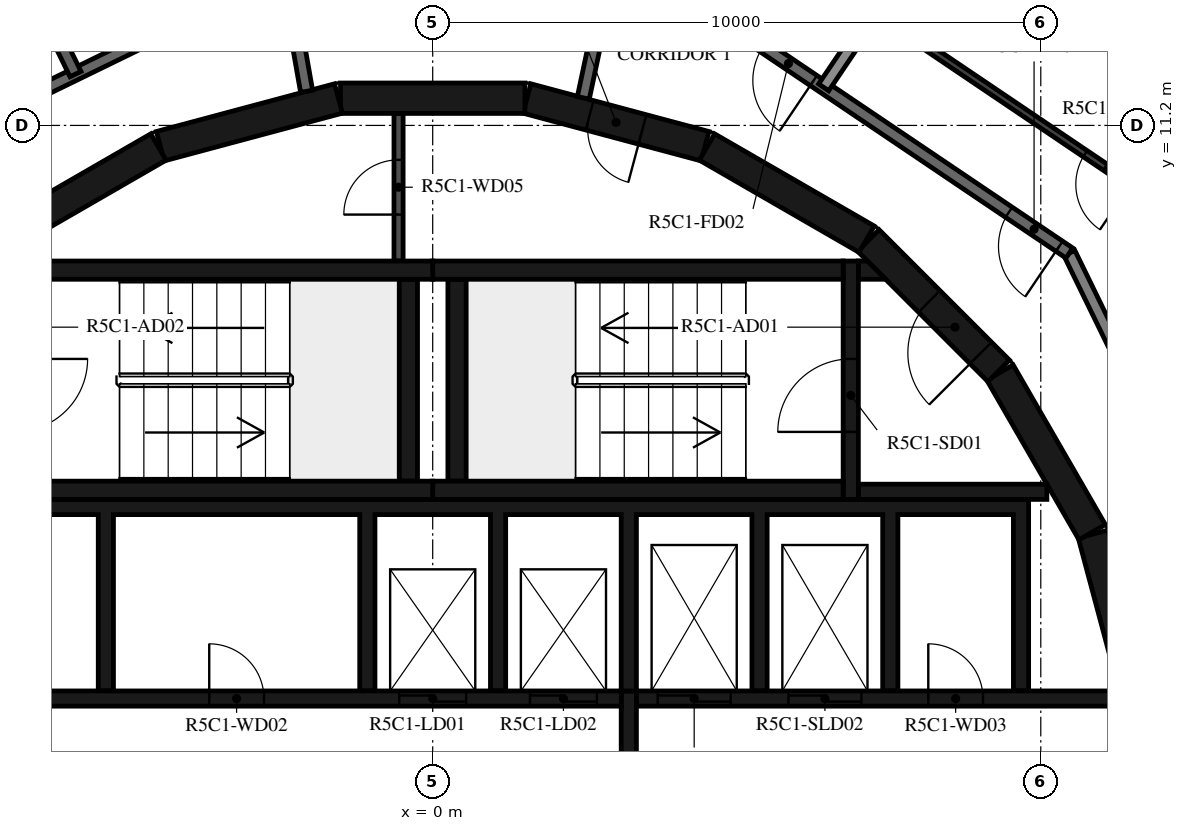
"""IFC4 building model, lengths in metres.
Left out: names, types, materials, properties, quantities, classifications, styles, units other than length and angle.
Written with IfcOpenShell. Run it as: python <this file> out.ifc"""

import sys

from ifc_helpers import new_model, si_unit, direction, frame, frame_2d, origin, place, context, subcontext, project, spatial, polyline, rectangle, outline, extrude, element, fill, save


model = new_model("IFC4")
c1 = context("Model", 3, precision=1e-05, world=origin(), true_north=direction((0.0, 1.0)))
c2 = subcontext(c1, "Body", "Model", "MODEL_VIEW")
j1 = project(units=[si_unit("LENGTHUNIT", "METRE"), si_unit("PLANEANGLEUNIT", "RADIAN")], contexts=[c1])
p1 = place(None, origin())
s1 = spatial("IfcSite", under=j1, at=p1, CompositionType="ELEMENT")
p2 = place(p1, origin())
s2 = spatial("IfcBuilding", under=s1, at=p2, CompositionType="ELEMENT")
p3 = place(p2, frame((0.0, 0.0, 212.9)))
s3 = spatial("IfcBuildingStorey", under=s2, at=p3, CompositionType="ELEMENT", Elevation=212.9)
for number, where, z_axis, x_axis in (
    (1, (11.643, 1.55, 0.0), (0.0, 0.0, 1.0), (-0.259, 0.966, 0.0)),
    (2, (10.845, 4.51, 0.0), (0.0, 0.0, 1.0), (-0.5, 0.866, 0.0)),
):
    element("IfcWall", number, at=place(p3, frame(where, z_axis=z_axis, x_axis=x_axis)), inside=s3, PredefinedType="SHEAR", context=c2, shape_type="SweptSolid", body=[
        extrude(rectangle(XDim=3.033, YDim=0.5, at=frame_2d((1.516, 0.0))), origin(), (0.0, 0.0, 1.0), 3.12),
    ])
p4 = place(p3, frame((9.308, 7.164, 0.0), z_axis=(0.0, 0.0, 1.0), x_axis=(-0.707106781187, 0.707106781187, 0.0)))
e3 = element("IfcWall", 3, at=p4, inside=s3, PredefinedType="SHEAR", context=c2, shape_type="SweptSolid", body=[
    extrude(rectangle(XDim=3.032, YDim=0.5, at=frame_2d((1.516, 0.0))), origin(), (0.0, 0.0, 1.0), 3.12),
])
p5 = place(p4, frame((0.416, 0.0, 0.0)))
e4 = element("IfcOpeningElement", 4, at=p5, cuts=e3, PredefinedType="OPENING", context=c2, shape_type="SweptSolid", body=[
    extrude(rectangle(XDim=1.2, YDim=2.1, at=frame_2d((0.6, 1.05))), frame((0.0, 0.26, 0.0), z_axis=(0.0, -1.0, 0.0), x_axis=(1.0, 0.0, 0.0)), (0.0, 0.0, 1.0), 0.52),
])
p6 = place(p3, frame((7.137, 9.329, 0.0), z_axis=(0.0, 0.0, 1.0), x_axis=(-0.865975092491, 0.500087131594, 0.0)))
e5 = element("IfcWall", 5, at=p6, inside=s3, PredefinedType="SHEAR", context=c2, shape_type="SweptSolid", body=[
    extrude(rectangle(XDim=3.033, YDim=0.5, at=frame_2d((1.516, 0.0))), origin(), (0.0, 0.0, 1.0), 3.12),
])
p7 = place(p3, frame((4.479, 10.858, 0.0), z_axis=(0.0, 0.0, 1.0), x_axis=(-0.965948410781, 0.258734743916, 0.0)))
e6 = element("IfcWall", 6, at=p7, inside=s3, PredefinedType="SHEAR", context=c2, shape_type="SweptSolid", body=[
    extrude(rectangle(XDim=3.033, YDim=0.5, at=frame_2d((1.516, 0.0))), origin(), (0.0, 0.0, 1.0), 3.12),
])
p8 = place(p7, frame((1.066, 0.0, 0.0)))
e7 = element("IfcOpeningElement", 7, at=p8, cuts=e6, PredefinedType="OPENING", context=c2, shape_type="SweptSolid", body=[
    extrude(rectangle(XDim=0.9, YDim=2.1, at=frame_2d((0.45, 1.05))), frame((0.0, 0.26, 0.0), z_axis=(0.0, -1.0, 0.0), x_axis=(1.0, 0.0, 0.0)), (0.0, 0.0, 1.0), 0.52),
])
for number, where, z_axis, x_axis in (
    (8, (1.516, 11.647, 0.0), (0.0, 0.0, 1.0), (-1.0, 0.0, 0.0)),
    (9, (-1.55, 11.643, 0.0), (0.0, 0.0, 1.0), (-0.966, -0.259, 0.0)),
    (10, (-4.51, 10.845, 0.0), (0.0, 0.0, 1.0), (-0.866, -0.5, 0.0)),
):
    element("IfcWall", number, at=place(p3, frame(where, z_axis=z_axis, x_axis=x_axis)), inside=s3, PredefinedType="SHEAR", context=c2, shape_type="SweptSolid", body=[
        extrude(rectangle(XDim=3.033, YDim=0.5, at=frame_2d((1.516, 0.0))), origin(), (0.0, 0.0, 1.0), 3.12),
    ])
for number, where, z_axis, x_axis in (
    (11, (0.0, 5.2, 0.0), (0.0, 0.0, 1.0), (1.0, 0.0, 0.0)),
    (12, (0.0, 8.82, 0.0), (0.0, 0.0, 1.0), (1.0, 0.0, 0.0)),
):
    element("IfcWall", number, at=place(p3, frame(where, z_axis=z_axis, x_axis=x_axis)), inside=s3, PredefinedType="SHEAR", context=c2, shape_type="SweptSolid", body=[
        extrude(rectangle(XDim=6.75, YDim=0.3, at=frame_2d((3.375, 0.0))), origin(), (0.0, 0.0, 1.0), 3.12),
    ])
p9 = place(p3, frame((0.4, 5.35, 0.0), z_axis=(0.0, 0.0, 1.0), x_axis=(0.0, 1.0, 0.0)))
e13 = element("IfcWall", 13, at=p9, inside=s3, PredefinedType="SHEAR", context=c2, shape_type="SweptSolid", body=[
    extrude(rectangle(XDim=3.32, YDim=0.3, at=frame_2d((1.66, 0.0))), origin(), (0.0, 0.0, 1.0), 3.12),
])
p10 = place(p3, frame((6.875, 5.05, 0.0), z_axis=(0.0, 0.0, 1.0), x_axis=(0.0, 1.0, 0.0)))
e14 = element("IfcWall", 14, at=p10, inside=s3, PredefinedType="SHEAR", context=c2, shape_type="SweptSolid", body=[
    extrude(rectangle(XDim=3.92, YDim=0.25, at=frame_2d((1.96, 0.0))), origin(), (0.0, 0.0, 1.0), 3.12),
])
p11 = place(p10, frame((1.11, 0.0, 0.0)))
e15 = element("IfcOpeningElement", 15, at=p11, cuts=e14, PredefinedType="OPENING", context=c2, shape_type="SweptSolid", body=[
    extrude(rectangle(XDim=1.2, YDim=2.1, at=frame_2d((0.6, 1.05))), frame((0.0, 0.135, 0.0), z_axis=(0.0, -1.0, 0.0), x_axis=(1.0, 0.0, 0.0)), (0.0, 0.0, 1.0), 0.27),
])
p12 = place(p3, frame((7.0, 5.175, 0.0), z_axis=(0.0, 0.0, 1.0), x_axis=(1.0, 0.0, 0.0)))
e16 = element("IfcWall", 16, at=p12, inside=s3, PredefinedType="SHEAR", context=c2, shape_type="SweptSolid", body=[
    extrude(rectangle(XDim=3.1, YDim=0.25, at=frame_2d((1.55, 0.0))), origin(), (0.0, 0.0, 1.0), 3.12),
])
p13 = place(p3, origin())
e17 = element("IfcWall", 17, at=p13, inside=s3, PredefinedType="SHEAR", context=c2, shape_type="SweptSolid", body=[
    extrude(outline(polyline([(7.448, 8.67), (7.0, 8.67), (7.0, 8.97), (7.148, 8.97), (7.448, 8.67)])), origin(), (0.0, 0.0, 1.0), 3.12),
])
for number, where, z_axis, x_axis in (
    (18, (-6.75, 5.2, 0.0), (0.0, 0.0, 1.0), (1.0, 0.0, 0.0)),
    (19, (-6.75, 8.82, 0.0), (0.0, 0.0, 1.0), (1.0, 0.0, 0.0)),
):
    element("IfcWall", number, at=place(p3, frame(where, z_axis=z_axis, x_axis=x_axis)), inside=s3, PredefinedType="SHEAR", context=c2, shape_type="SweptSolid", body=[
        extrude(rectangle(XDim=6.75, YDim=0.3, at=frame_2d((3.375, 0.0))), origin(), (0.0, 0.0, 1.0), 3.12),
    ])
p14 = place(p3, frame((-0.4, 5.35, 0.0), z_axis=(0.0, 0.0, 1.0), x_axis=(0.0, 1.0, 0.0)))
e20 = element("IfcWall", 20, at=p14, inside=s3, PredefinedType="SHEAR", context=c2, shape_type="SweptSolid", body=[
    extrude(rectangle(XDim=3.32, YDim=0.3, at=frame_2d((1.66, 0.0))), origin(), (0.0, 0.0, 1.0), 3.12),
])
p15 = place(p3, origin())
e21 = element("IfcWall", 21, at=p15, inside=s3, PredefinedType="SHEAR", context=c2, shape_type="SweptSolid", body=[
    extrude(outline(polyline([(-9.55, 4.8), (-5.5, 4.8), (-5.5, 1.9), (-5.25, 1.9), (-5.25, 4.8), (-1.2, 4.8), (-1.2, 1.9), (-0.95, 1.9), (-0.95, 4.8), (0.95, 4.8), (0.95, 1.9), (1.2, 1.9), (1.2, 4.8), (3.1, 4.8), (3.1, 1.9), (3.35, 1.9), (3.35, 4.8), (5.25, 4.8), (5.25, 1.9), (5.5, 1.9), (5.5, 4.8), (7.4, 4.8), (7.4, 1.9), (7.65, 1.9), (7.65, 4.8), (9.55, 4.8), (9.55, 1.9), (9.8, 1.9), (9.8, 4.8), (9.8, 5.05), (-9.8, 5.05), (-9.8, 4.8), (-9.8, 1.9), (-9.55, 1.9), (-9.55, 4.8)])), origin(), (0.0, 0.0, 1.0), 3.12),
])
p16 = place(p3, frame((-11.28, 1.775, 0.0), z_axis=(0.0, 0.0, 1.0), x_axis=(1.0, 0.0, 0.0)))
e22 = element("IfcWall", 22, at=p16, inside=s3, PredefinedType="SHEAR", context=c2, shape_type="SweptSolid", body=[
    extrude(rectangle(XDim=14.38, YDim=0.25, at=frame_2d((7.19, 0.0))), origin(), (0.0, 0.0, 1.0), 3.12),
])
p17 = place(p16, frame((10.73, 0.0, 0.0)))
e23 = element("IfcOpeningElement", 23, at=p17, cuts=e22, PredefinedType="OPENING", context=c2, shape_type="SweptSolid", body=[
    extrude(rectangle(XDim=1.1, YDim=2.1, at=frame_2d((0.55, 1.05))), frame((0.0, 0.135, 0.0), z_axis=(0.0, -1.0, 0.0), x_axis=(1.0, 0.0, 0.0)), (0.0, 0.0, 1.0), 0.27),
])
p18 = place(p16, frame((12.88, 0.0, 0.0)))
e24 = element("IfcOpeningElement", 24, at=p18, cuts=e22, PredefinedType="OPENING", context=c2, shape_type="SweptSolid", body=[
    extrude(rectangle(XDim=1.1, YDim=2.1, at=frame_2d((0.55, 1.05))), frame((0.0, 0.135, 0.0), z_axis=(0.0, -1.0, 0.0), x_axis=(1.0, 0.0, 0.0)), (0.0, 0.0, 1.0), 0.27),
])
p19 = place(p16, frame((3.305, 0.0, 0.0)))
e25 = element("IfcOpeningElement", 25, at=p19, cuts=e22, PredefinedType="OPENING", context=c2, shape_type="SweptSolid", body=[
    extrude(rectangle(XDim=0.9, YDim=2.1, at=frame_2d((0.45, 1.05))), frame((0.0, 0.135, 0.0), z_axis=(0.0, -1.0, 0.0), x_axis=(1.0, 0.0, 0.0)), (0.0, 0.0, 1.0), 0.27),
])
p20 = place(p16, frame((7.605, 0.0, 0.0)))
e26 = element("IfcOpeningElement", 26, at=p20, cuts=e22, PredefinedType="OPENING", context=c2, shape_type="SweptSolid", body=[
    extrude(rectangle(XDim=0.9, YDim=2.1, at=frame_2d((0.45, 1.05))), frame((0.0, 0.135, 0.0), z_axis=(0.0, -1.0, 0.0), x_axis=(1.0, 0.0, 0.0)), (0.0, 0.0, 1.0), 0.27),
])
p21 = place(p3, frame((3.35, 1.775, 0.0), z_axis=(0.0, 0.0, 1.0), x_axis=(1.0, 0.0, 0.0)))
e27 = element("IfcWall", 27, at=p21, inside=s3, PredefinedType="SHEAR", context=c2, shape_type="SweptSolid", body=[
    extrude(rectangle(XDim=7.93, YDim=0.25, at=frame_2d((3.965, 0.0))), origin(), (0.0, 0.0, 1.0), 3.12),
])
p22 = place(p21, frame((0.35, 0.0, 0.0)))
e28 = element("IfcOpeningElement", 28, at=p22, cuts=e27, PredefinedType="OPENING", context=c2, shape_type="SweptSolid", body=[
    extrude(rectangle(XDim=1.2, YDim=2.4, at=frame_2d((0.6, 1.2))), frame((0.0, 0.135, 0.0), z_axis=(0.0, -1.0, 0.0), x_axis=(1.0, 0.0, 0.0)), (0.0, 0.0, 1.0), 0.27),
])
p23 = place(p21, frame((2.5, 0.0, 0.0)))
e29 = element("IfcOpeningElement", 29, at=p23, cuts=e27, PredefinedType="OPENING", context=c2, shape_type="SweptSolid", body=[
    extrude(rectangle(XDim=1.2, YDim=2.4, at=frame_2d((0.6, 1.2))), frame((0.0, 0.135, 0.0), z_axis=(0.0, -1.0, 0.0), x_axis=(1.0, 0.0, 0.0)), (0.0, 0.0, 1.0), 0.27),
])
p24 = place(p21, frame((4.8, 0.0, 0.0)))
e30 = element("IfcOpeningElement", 30, at=p24, cuts=e27, PredefinedType="OPENING", context=c2, shape_type="SweptSolid", body=[
    extrude(rectangle(XDim=0.9, YDim=2.1, at=frame_2d((0.45, 1.05))), frame((0.0, 0.135, 0.0), z_axis=(0.0, -1.0, 0.0), x_axis=(1.0, 0.0, 0.0)), (0.0, 0.0, 1.0), 0.27),
])
p25 = place(p3, frame((3.225, -1.9, 0.0), z_axis=(0.0, 0.0, 1.0), x_axis=(0.0, 1.0, 0.0)))
e31 = element("IfcWall", 31, at=p25, inside=s3, PredefinedType="SHEAR", context=c2, shape_type="SweptSolid", body=[
    extrude(rectangle(XDim=3.8, YDim=0.25, at=frame_2d((1.9, 0.0))), origin(), (0.0, 0.0, 1.0), 3.12),
])
p26 = place(p3, frame((-0.562, 8.97, 0.0), z_axis=(0.0, 0.0, 1.0), x_axis=(0.0, 1.0, 0.0)))
e32 = element("IfcWall", 32, at=p26, inside=s3, PredefinedType="PARTITIONING", context=c2, shape_type="SweptSolid", body=[
    extrude(rectangle(XDim=2.427, YDim=0.15, at=frame_2d((1.214, 0.0))), origin(), (0.0, 0.0, 1.0), 3.12),
])
p27 = place(p26, frame((0.764, 0.0, 0.0)))
e33 = element("IfcOpeningElement", 33, at=p27, cuts=e32, PredefinedType="OPENING", context=c2, shape_type="SweptSolid", body=[
    extrude(rectangle(XDim=0.9, YDim=2.1, at=frame_2d((0.45, 1.05))), frame((0.0, 0.085, 0.0), z_axis=(0.0, -1.0, 0.0), x_axis=(1.0, 0.0, 0.0)), (0.0, 0.0, 1.0), 0.17),
])
p28 = place(p3, frame((13.618, 2.647, 0.0), z_axis=(0.0, 0.0, 1.0), x_axis=(-0.438366026218, 0.898796543751, 0.0)))
e34 = element("IfcWall", 34, at=p28, inside=s3, PredefinedType="STANDARD", context=c2, shape_type="SweptSolid", body=[
    extrude(rectangle(XDim=7.181, YDim=0.2, at=frame_2d((3.591, 0.0))), origin(), (0.0, 0.0, 1.0), 3.12),
])
p29 = place(p3, frame((10.47, 9.101, 0.0), z_axis=(0.0, 0.0, 1.0), x_axis=(-0.829035841718, 0.559195469534, 0.0)))
e35 = element("IfcWall", 35, at=p29, inside=s3, PredefinedType="STANDARD", context=c2, shape_type="SweptSolid", body=[
    extrude(rectangle(XDim=7.181, YDim=0.2, at=frame_2d((3.591, 0.0))), origin(), (0.0, 0.0, 1.0), 3.12),
])
p30 = place(p29, frame((0.2, 0.0, 0.0)))
e36 = element("IfcOpeningElement", 36, at=p30, cuts=e35, PredefinedType="OPENING", context=c2, shape_type="SweptSolid", body=[
    extrude(rectangle(XDim=1.0, YDim=2.1, at=frame_2d((0.5, 1.05))), frame((0.0, 0.11, 0.0), z_axis=(0.0, -1.0, 0.0), x_axis=(1.0, 0.0, 0.0)), (0.0, 0.0, 1.0), 0.22),
])
p31 = place(p29, frame((5.073, 0.0, 0.0)))
e37 = element("IfcOpeningElement", 37, at=p31, cuts=e35, PredefinedType="OPENING", context=c2, shape_type="SweptSolid", body=[
    extrude(rectangle(XDim=1.0, YDim=2.1, at=frame_2d((0.5, 1.05))), frame((0.0, 0.11, 0.0), z_axis=(0.0, -1.0, 0.0), x_axis=(1.0, 0.0, 0.0)), (0.0, 0.0, 1.0), 0.22),
])
p32 = place(p3, frame((2.813, 13.236, 0.0), z_axis=(0.0, 0.0, 1.0), x_axis=(-0.207911086063, -0.978147729278, 0.0)))
e38 = element("IfcWall", 38, at=p32, inside=s3, PredefinedType="STANDARD", context=c2, shape_type="SweptSolid", body=[
    extrude(rectangle(XDim=1.618, YDim=0.2, at=frame_2d((0.809, 0.0))), origin(), (0.0, 0.0, 1.0), 3.12),
])
p33 = place(p3, frame((-2.074, 11.761, 0.0), z_axis=(0.0, 0.0, 1.0), x_axis=(-0.173740587112, 0.984791454263, 0.0)))
e39 = element("IfcWall", 39, at=p33, inside=s3, PredefinedType="STANDARD", context=c2, shape_type="SweptSolid", body=[
    extrude(rectangle(XDim=1.867, YDim=0.2, at=frame_2d((0.934, 0.0))), origin(), (0.0, 0.0, 1.0), 3.12),
])
p34 = place(p3, frame((-2.647, 13.618, 0.0), z_axis=(0.0, 0.0, 1.0), x_axis=(-0.898796543751, -0.438366026218, 0.0)))
e40 = element("IfcWall", 40, at=p34, inside=s3, PredefinedType="STANDARD", context=c2, shape_type="SweptSolid", body=[
    extrude(rectangle(XDim=7.181, YDim=0.2, at=frame_2d((3.591, 0.0))), origin(), (0.0, 0.0, 1.0), 3.12),
])
p35 = place(p3, frame((9.104, 15.79, 0.0), z_axis=(0.0, 0.0, 1.0), x_axis=(-0.559193912135, -0.829036892201, 0.0)))
e41 = element("IfcWall", 41, at=p35, inside=s3, PredefinedType="STANDARD", context=c2, shape_type="SweptSolid", body=[
    extrude(rectangle(XDim=4.781, YDim=0.2, at=frame_2d((2.39, 0.0))), origin(), (0.0, 0.0, 1.0), 2.73),
])
p36 = place(p3, frame((-6.522, 13.373, 0.0), z_axis=(0.0, 0.0, 1.0), x_axis=(0.438277270821, -0.8988398266, 0.0)))
e42 = element("IfcWall", 42, at=p36, inside=s3, PredefinedType="STANDARD", context=c2, shape_type="SweptSolid", body=[
    extrude(rectangle(XDim=1.479, YDim=0.2, at=frame_2d((0.74, 0.0))), origin(), (0.0, 0.0, 1.0), 3.12),
])
p37 = place(p3, frame((11.642, 10.12, 0.0), z_axis=(0.0, 0.0, 1.0), x_axis=(-0.829054664054, 0.559167563446, 0.0)))
e43 = element("IfcWall", 43, at=p37, inside=s3, PredefinedType="PARTITIONING", context=c2, shape_type="SweptSolid", body=[
    extrude(rectangle(XDim=5.275, YDim=0.12, at=frame_2d((2.637, 0.0))), origin(), (0.0, 0.0, 1.0), 3.12),
])
p38 = place(p37, frame((0.2, 0.0, 0.0)))
e44 = element("IfcOpeningElement", 44, at=p38, cuts=e43, PredefinedType="OPENING", context=c2, shape_type="SweptSolid", body=[
    extrude(rectangle(XDim=0.9, YDim=2.1, at=frame_2d((0.45, 1.05))), frame((0.0, 0.07, 0.0), z_axis=(0.0, -1.0, 0.0), x_axis=(1.0, 0.0, 0.0)), (0.0, 0.0, 1.0), 0.14),
])
p39 = place(p11, origin())
e45 = element("IfcDoor", 45, at=p39, inside=s3, OperationType="SINGLE_SWING_LEFT", PredefinedType="DOOR", context=c2, shape_type="SweptSolid", body=[
    extrude(rectangle(XDim=1.2, YDim=2.1, at=frame_2d((0.6, 1.05))), frame((0.0, 0.025, 0.0), z_axis=(0.0, -1.0, 0.0), x_axis=(1.0, 0.0, 0.0)), (0.0, 0.0, 1.0), 0.05),
])
fill(e15, e45)
p40 = place(p5, origin())
e46 = element("IfcDoor", 46, at=p40, inside=s3, OperationType="SINGLE_SWING_RIGHT", PredefinedType="DOOR", context=c2, shape_type="SweptSolid", body=[
    extrude(rectangle(XDim=1.2, YDim=2.1, at=frame_2d((0.6, 1.05))), frame((0.0, 0.025, 0.0), z_axis=(0.0, -1.0, 0.0), x_axis=(1.0, 0.0, 0.0)), (0.0, 0.0, 1.0), 0.05),
])
fill(e4, e46)
p41 = place(p17, origin())
e47 = element("IfcDoor", 47, at=p41, inside=s3, OperationType="DOUBLE_DOOR_SLIDING", PredefinedType="DOOR", context=c2, shape_type="SweptSolid", body=[
    extrude(rectangle(XDim=1.1, YDim=2.1, at=frame_2d((0.55, 1.05))), frame((0.0, 0.025, 0.0), z_axis=(0.0, -1.0, 0.0), x_axis=(1.0, 0.0, 0.0)), (0.0, 0.0, 1.0), 0.05),
])
fill(e23, e47)
p42 = place(p18, origin())
e48 = element("IfcDoor", 48, at=p42, inside=s3, OperationType="DOUBLE_DOOR_SLIDING", PredefinedType="DOOR", context=c2, shape_type="SweptSolid", body=[
    extrude(rectangle(XDim=1.1, YDim=2.1, at=frame_2d((0.55, 1.05))), frame((0.0, 0.025, 0.0), z_axis=(0.0, -1.0, 0.0), x_axis=(1.0, 0.0, 0.0)), (0.0, 0.0, 1.0), 0.05),
])
fill(e24, e48)
p43 = place(p22, origin())
e49 = element("IfcDoor", 49, at=p43, inside=s3, OperationType="DOUBLE_DOOR_SLIDING", PredefinedType="DOOR", context=c2, shape_type="SweptSolid", body=[
    extrude(rectangle(XDim=1.2, YDim=2.4, at=frame_2d((0.6, 1.2))), frame((0.0, 0.025, 0.0), z_axis=(0.0, -1.0, 0.0), x_axis=(1.0, 0.0, 0.0)), (0.0, 0.0, 1.0), 0.05),
])
fill(e28, e49)
p44 = place(p23, origin())
e50 = element("IfcDoor", 50, at=p44, inside=s3, OperationType="DOUBLE_DOOR_SLIDING", PredefinedType="DOOR", context=c2, shape_type="SweptSolid", body=[
    extrude(rectangle(XDim=1.2, YDim=2.4, at=frame_2d((0.6, 1.2))), frame((0.0, 0.025, 0.0), z_axis=(0.0, -1.0, 0.0), x_axis=(1.0, 0.0, 0.0)), (0.0, 0.0, 1.0), 0.05),
])
fill(e29, e50)
p45 = place(p20, origin())
e51 = element("IfcDoor", 51, at=p45, inside=s3, OperationType="SINGLE_SWING_RIGHT", PredefinedType="DOOR", context=c2, shape_type="SweptSolid", body=[
    extrude(rectangle(XDim=0.9, YDim=2.1, at=frame_2d((0.45, 1.05))), frame((0.0, 0.025, 0.0), z_axis=(0.0, -1.0, 0.0), x_axis=(1.0, 0.0, 0.0)), (0.0, 0.0, 1.0), 0.05),
])
fill(e26, e51)
p46 = place(p24, origin())
e52 = element("IfcDoor", 52, at=p46, inside=s3, OperationType="SINGLE_SWING_LEFT", PredefinedType="DOOR", context=c2, shape_type="SweptSolid", body=[
    extrude(rectangle(XDim=0.9, YDim=2.1, at=frame_2d((0.45, 1.05))), frame((0.0, 0.025, 0.0), z_axis=(0.0, -1.0, 0.0), x_axis=(1.0, 0.0, 0.0)), (0.0, 0.0, 1.0), 0.05),
])
fill(e30, e52)
p47 = place(p27, origin())
e53 = element("IfcDoor", 53, at=p47, inside=s3, OperationType="SINGLE_SWING_LEFT", PredefinedType="DOOR", context=c2, shape_type="SweptSolid", body=[
    extrude(rectangle(XDim=0.9, YDim=2.1, at=frame_2d((0.45, 1.05))), frame((0.0, 0.025, 0.0), z_axis=(0.0, -1.0, 0.0), x_axis=(1.0, 0.0, 0.0)), (0.0, 0.0, 1.0), 0.05),
])
fill(e33, e53)
p48 = place(p8, origin())
e54 = element("IfcDoor", 54, at=p48, inside=s3, OperationType="SINGLE_SWING_RIGHT", PredefinedType="DOOR", context=c2, shape_type="SweptSolid", body=[
    extrude(rectangle(XDim=0.9, YDim=2.1, at=frame_2d((0.45, 1.05))), frame((0.0, 0.025, 0.0), z_axis=(0.0, -1.0, 0.0), x_axis=(1.0, 0.0, 0.0)), (0.0, 0.0, 1.0), 0.05),
])
fill(e7, e54)
p49 = place(p30, origin())
e55 = element("IfcDoor", 55, at=p49, inside=s3, OperationType="SINGLE_SWING_LEFT", PredefinedType="DOOR", context=c2, shape_type="SweptSolid", body=[
    extrude(rectangle(XDim=1.0, YDim=2.1, at=frame_2d((0.5, 1.05))), frame((0.0, 0.025, 0.0), z_axis=(0.0, -1.0, 0.0), x_axis=(1.0, 0.0, 0.0)), (0.0, 0.0, 1.0), 0.05),
])
fill(e36, e55)
p50 = place(p38, origin())
e56 = element("IfcDoor", 56, at=p50, inside=s3, OperationType="SINGLE_SWING_LEFT", PredefinedType="DOOR", context=c2, shape_type="SweptSolid", body=[
    extrude(rectangle(XDim=0.9, YDim=2.1, at=frame_2d((0.45, 1.05))), frame((0.0, 0.025, 0.0), z_axis=(0.0, -1.0, 0.0), x_axis=(1.0, 0.0, 0.0)), (0.0, 0.0, 1.0), 0.05),
])
fill(e44, e56)
p51 = place(p31, origin())
e57 = element("IfcDoor", 57, at=p51, inside=s3, OperationType="SINGLE_SWING_RIGHT", PredefinedType="DOOR", context=c2, shape_type="SweptSolid", body=[
    extrude(rectangle(XDim=1.0, YDim=2.1, at=frame_2d((0.5, 1.05))), frame((0.0, 0.025, 0.0), z_axis=(0.0, -1.0, 0.0), x_axis=(1.0, 0.0, 0.0)), (0.0, 0.0, 1.0), 0.05),
])
fill(e37, e57)
save(model, sys.argv[1])
